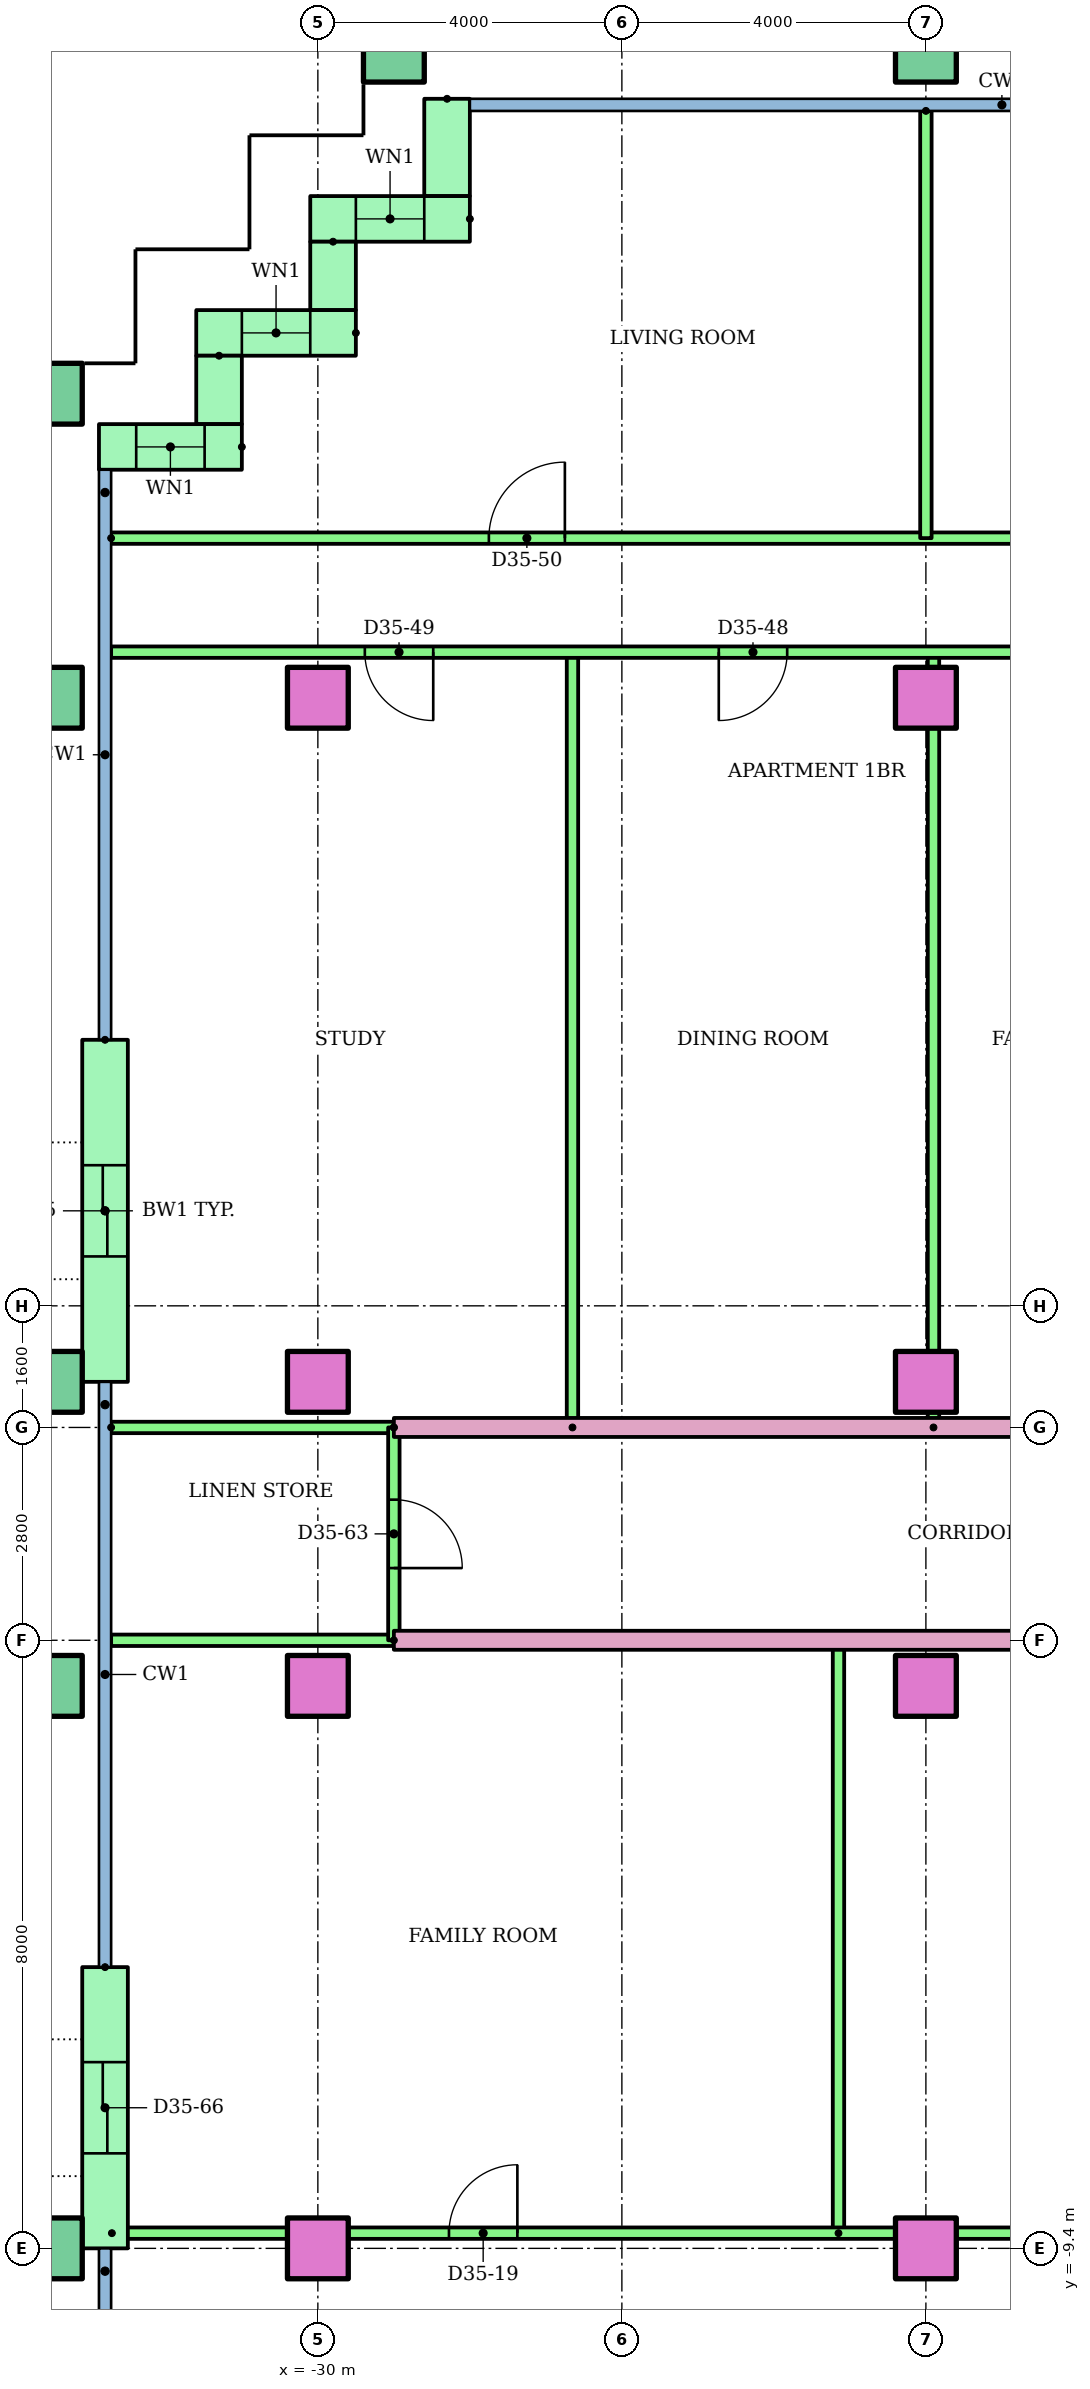
"""IFC4 building model, lengths in metres.
Left out: names, types, materials, properties, quantities, classifications, styles, units other than length and angle.
Written with IfcOpenShell. Run it as: python <this file> out.ifc"""

import sys

from ifc_helpers import new_model, si_unit, direction, frame, frame_2d, origin, origin_2d, place, context, subcontext, project, spatial, rectangle, hollow_rectangle, extrude, element, fill, save


model = new_model("IFC4")
c1 = context("Model", 3, precision=1e-05, world=origin(), true_north=direction((0.0, 1.0)))
c2 = subcontext(c1, "Body", "Model", "MODEL_VIEW")
j1 = project(units=[si_unit("LENGTHUNIT", "METRE"), si_unit("PLANEANGLEUNIT", "RADIAN")], contexts=[c1])
p1 = place(None, origin())
s1 = spatial("IfcSite", under=j1, at=p1, CompositionType="ELEMENT")
p2 = place(p1, origin())
s2 = spatial("IfcBuilding", under=s1, at=p2, CompositionType="ELEMENT")
p3 = place(p2, frame((0.0, 0.0, 135.8)))
s3 = spatial("IfcBuildingStorey", under=s2, at=p3, CompositionType="ELEMENT", Elevation=135.8)
p4 = place(p3, frame((-33.5, -9.4, 0.0)))
e1 = element("IfcColumn", 1, at=p4, inside=s3, PredefinedType="COLUMN", context=c2, shape_type="SweptSolid", body=[
    extrude(hollow_rectangle(XDim=0.8, YDim=0.8, WallThickness=0.04, at=origin_2d()), origin(), (0.0, 0.0, 1.0), 3.2),
])
for number, where in (
    (2, (-30.0, -9.4, 0.0)),
    (3, (-22.0, -9.4, 0.0)),
):
    element("IfcColumn", number, at=place(p3, frame(where)), inside=s3, PredefinedType="COLUMN", context=c2, shape_type="SweptSolid", body=[
        extrude(rectangle(XDim=0.8, YDim=0.8, at=origin_2d()), origin(), (0.0, 0.0, 1.0), 3.2),
    ])
p5 = place(p3, frame((-33.5, -2.0, 0.0)))
e4 = element("IfcColumn", 4, at=p5, inside=s3, PredefinedType="COLUMN", context=c2, shape_type="SweptSolid", body=[
    extrude(hollow_rectangle(XDim=0.8, YDim=0.8, WallThickness=0.04, at=origin_2d()), origin(), (0.0, 0.0, 1.0), 3.2),
])
for number, where in (
    (5, (-30.0, -2.0, 0.0)),
    (6, (-22.0, -2.0, 0.0)),
):
    element("IfcColumn", number, at=place(p3, frame(where)), inside=s3, PredefinedType="COLUMN", context=c2, shape_type="SweptSolid", body=[
        extrude(rectangle(XDim=0.8, YDim=0.8, at=origin_2d()), origin(), (0.0, 0.0, 1.0), 3.2),
    ])
p6 = place(p3, frame((-33.5, 2.0, 0.0)))
e7 = element("IfcColumn", 7, at=p6, inside=s3, PredefinedType="COLUMN", context=c2, shape_type="SweptSolid", body=[
    extrude(hollow_rectangle(XDim=0.8, YDim=0.8, WallThickness=0.04, at=origin_2d()), origin(), (0.0, 0.0, 1.0), 3.2),
])
for number, where in (
    (8, (-30.0, 2.0, 0.0)),
    (9, (-22.0, 2.0, 0.0)),
):
    element("IfcColumn", number, at=place(p3, frame(where)), inside=s3, PredefinedType="COLUMN", context=c2, shape_type="SweptSolid", body=[
        extrude(rectangle(XDim=0.8, YDim=0.8, at=origin_2d()), origin(), (0.0, 0.0, 1.0), 3.2),
    ])
p7 = place(p3, frame((-33.5, 11.0, 0.0)))
e10 = element("IfcColumn", 10, at=p7, inside=s3, PredefinedType="COLUMN", context=c2, shape_type="SweptSolid", body=[
    extrude(hollow_rectangle(XDim=0.8, YDim=0.8, WallThickness=0.04, at=origin_2d()), origin(), (0.0, 0.0, 1.0), 3.2),
])
for number, where in (
    (11, (-30.0, 11.0, 0.0)),
    (12, (-22.0, 11.0, 0.0)),
):
    element("IfcColumn", number, at=place(p3, frame(where)), inside=s3, PredefinedType="COLUMN", context=c2, shape_type="SweptSolid", body=[
        extrude(rectangle(XDim=0.8, YDim=0.8, at=origin_2d()), origin(), (0.0, 0.0, 1.0), 3.2),
    ])
for number, where in (
    (13, (-33.5, 15.0, 0.0)),
    (14, (-29.0, 19.5, 0.0)),
    (15, (-22.0, 19.5, 0.0)),
):
    element("IfcColumn", number, at=place(p3, frame(where)), inside=s3, PredefinedType="COLUMN", context=c2, shape_type="SweptSolid", body=[
        extrude(hollow_rectangle(XDim=0.8, YDim=0.8, WallThickness=0.04, at=origin_2d()), origin(), (0.0, 0.0, 1.0), 3.2),
    ])
p8 = place(p3, frame((-28.3, 18.88, 0.0), z_axis=(0.0, 0.0, 1.0), x_axis=(0.0, -1.0, 0.0)))
e16 = element("IfcWall", 16, at=p8, inside=s3, PredefinedType="STANDARD", context=c2, shape_type="SweptSolid", body=[
    extrude(rectangle(XDim=1.28, YDim=0.6, at=frame_2d((0.64, 0.0))), origin(), (0.0, 0.0, 1.0), 2.92),
])
p9 = place(p3, frame((-28.0, 17.3, 0.0), z_axis=(0.0, 0.0, 1.0), x_axis=(-1.0, 0.0, 0.0)))
e17 = element("IfcWall", 17, at=p9, inside=s3, PredefinedType="STANDARD", context=c2, shape_type="SweptSolid", body=[
    extrude(rectangle(XDim=2.1, YDim=0.6, at=frame_2d((1.05, 0.0))), origin(), (0.0, 0.0, 1.0), 2.92),
])
p10 = place(p9, frame((0.6, 0.0, 0.9)))
e18 = element("IfcOpeningElement", 18, at=p10, cuts=e17, PredefinedType="OPENING", context=c2, shape_type="SweptSolid", body=[
    extrude(rectangle(XDim=0.9, YDim=1.5, at=frame_2d((0.45, 0.75))), frame((0.0, 0.31, 0.0), z_axis=(0.0, -1.0, 0.0), x_axis=(1.0, 0.0, 0.0)), (0.0, 0.0, 1.0), 0.62),
])
p11 = place(p3, frame((-29.8, 17.0, 0.0), z_axis=(0.0, 0.0, 1.0), x_axis=(0.0, -1.0, 0.0)))
e19 = element("IfcWall", 19, at=p11, inside=s3, PredefinedType="STANDARD", context=c2, shape_type="SweptSolid", body=[
    extrude(rectangle(XDim=0.9, YDim=0.6, at=frame_2d((0.45, 0.0))), origin(), (0.0, 0.0, 1.0), 2.92),
])
p12 = place(p3, frame((-29.5, 15.8, 0.0), z_axis=(0.0, 0.0, 1.0), x_axis=(-1.0, 0.0, 0.0)))
e20 = element("IfcWall", 20, at=p12, inside=s3, PredefinedType="STANDARD", context=c2, shape_type="SweptSolid", body=[
    extrude(rectangle(XDim=2.1, YDim=0.6, at=frame_2d((1.05, 0.0))), origin(), (0.0, 0.0, 1.0), 2.92),
])
p13 = place(p12, frame((0.6, 0.0, 0.9)))
e21 = element("IfcOpeningElement", 21, at=p13, cuts=e20, PredefinedType="OPENING", context=c2, shape_type="SweptSolid", body=[
    extrude(rectangle(XDim=0.9, YDim=1.5, at=frame_2d((0.45, 0.75))), frame((0.0, 0.31, 0.0), z_axis=(0.0, -1.0, 0.0), x_axis=(1.0, 0.0, 0.0)), (0.0, 0.0, 1.0), 0.62),
])
p14 = place(p3, frame((-31.3, 15.5, 0.0), z_axis=(0.0, 0.0, 1.0), x_axis=(0.0, -1.0, 0.0)))
e22 = element("IfcWall", 22, at=p14, inside=s3, PredefinedType="STANDARD", context=c2, shape_type="SweptSolid", body=[
    extrude(rectangle(XDim=0.9, YDim=0.6, at=frame_2d((0.45, 0.0))), origin(), (0.0, 0.0, 1.0), 2.92),
])
p15 = place(p3, frame((-31.0, 14.3, 0.0), z_axis=(0.0, 0.0, 1.0), x_axis=(-1.0, 0.0, 0.0)))
e23 = element("IfcWall", 23, at=p15, inside=s3, PredefinedType="STANDARD", context=c2, shape_type="SweptSolid", body=[
    extrude(rectangle(XDim=1.88, YDim=0.6, at=frame_2d((0.94, 0.0))), origin(), (0.0, 0.0, 1.0), 2.92),
])
p16 = place(p15, frame((0.49, 0.0, 0.9)))
e24 = element("IfcOpeningElement", 24, at=p16, cuts=e23, PredefinedType="OPENING", context=c2, shape_type="SweptSolid", body=[
    extrude(rectangle(XDim=0.9, YDim=1.5, at=frame_2d((0.45, 0.75))), frame((0.0, 0.31, 0.0), z_axis=(0.0, -1.0, 0.0), x_axis=(1.0, 0.0, 0.0)), (0.0, 0.0, 1.0), 0.62),
])
p17 = place(p3, frame((-32.8, 6.5, 0.0), z_axis=(0.0, 0.0, 1.0), x_axis=(0.0, -1.0, 0.0)))
e25 = element("IfcWall", 25, at=p17, inside=s3, PredefinedType="STANDARD", context=c2, shape_type="SweptSolid", body=[
    extrude(rectangle(XDim=4.5, YDim=0.6, at=frame_2d((2.25, 0.0))), origin(), (0.0, 0.0, 1.0), 2.92),
])
p18 = place(p17, frame((1.65, 0.0, 0.0)))
e26 = element("IfcOpeningElement", 26, at=p18, cuts=e25, PredefinedType="OPENING", context=c2, shape_type="SweptSolid", body=[
    extrude(rectangle(XDim=1.2, YDim=2.1, at=frame_2d((0.6, 1.05))), frame((0.0, 0.31, 0.0), z_axis=(0.0, -1.0, 0.0), x_axis=(1.0, 0.0, 0.0)), (0.0, 0.0, 1.0), 0.62),
])
p19 = place(p3, frame((-32.8, -5.7, 0.0), z_axis=(0.0, 0.0, 1.0), x_axis=(0.0, -1.0, 0.0)))
e27 = element("IfcWall", 27, at=p19, inside=s3, PredefinedType="STANDARD", context=c2, shape_type="SweptSolid", body=[
    extrude(rectangle(XDim=3.7, YDim=0.6, at=frame_2d((1.85, 0.0))), origin(), (0.0, 0.0, 1.0), 2.92),
])
p20 = place(p19, frame((1.25, 0.0, 0.0)))
e28 = element("IfcOpeningElement", 28, at=p20, cuts=e27, PredefinedType="OPENING", context=c2, shape_type="SweptSolid", body=[
    extrude(rectangle(XDim=1.2, YDim=2.1, at=frame_2d((0.6, 1.05))), frame((0.0, 0.31, 0.0), z_axis=(0.0, -1.0, 0.0), x_axis=(1.0, 0.0, 0.0)), (0.0, 0.0, 1.0), 0.62),
])
p21 = place(p3, frame((-23.15, -9.2, 0.0), z_axis=(0.0, 0.0, 1.0), x_axis=(0.0, 1.0, 0.0)))
e29 = element("IfcWall", 29, at=p21, inside=s3, PredefinedType="PARTITIONING", context=c2, shape_type="SweptSolid", body=[
    extrude(rectangle(XDim=7.8, YDim=0.15, at=frame_2d((3.9, 0.0))), origin(), (0.0, 0.0, 1.0), 2.4),
])
p22 = place(p3, frame((-32.71, -9.2, 0.0)))
e30 = element("IfcWall", 30, at=p22, inside=s3, PredefinedType="PARTITIONING", context=c2, shape_type="SweptSolid", body=[
    extrude(rectangle(XDim=24.71, YDim=0.15, at=frame_2d((12.355, 0.0))), origin(), (0.0, 0.0, 1.0), 2.4),
])
p23 = place(p22, frame((19.328, 0.0, 0.0)))
e31 = element("IfcOpeningElement", 31, at=p23, cuts=e30, PredefinedType="OPENING", context=c2, shape_type="SweptSolid", body=[
    extrude(rectangle(XDim=0.9, YDim=2.1, at=frame_2d((0.45, 1.05))), frame((0.0, 0.085, 0.0), z_axis=(0.0, -1.0, 0.0), x_axis=(1.0, 0.0, 0.0)), (0.0, 0.0, 1.0), 0.17),
])
p24 = place(p22, frame((12.735, 0.0, 0.0)))
e32 = element("IfcOpeningElement", 32, at=p24, cuts=e30, PredefinedType="OPENING", context=c2, shape_type="SweptSolid", body=[
    extrude(rectangle(XDim=0.9, YDim=2.1, at=frame_2d((0.45, 1.05))), frame((0.0, 0.085, 0.0), z_axis=(0.0, -1.0, 0.0), x_axis=(1.0, 0.0, 0.0)), (0.0, 0.0, 1.0), 0.17),
])
p25 = place(p22, frame((4.435, 0.0, 0.0)))
e33 = element("IfcOpeningElement", 33, at=p25, cuts=e30, PredefinedType="OPENING", context=c2, shape_type="SweptSolid", body=[
    extrude(rectangle(XDim=0.9, YDim=2.1, at=frame_2d((0.45, 1.05))), frame((0.0, 0.085, 0.0), z_axis=(0.0, -1.0, 0.0), x_axis=(1.0, 0.0, 0.0)), (0.0, 0.0, 1.0), 0.17),
])
p26 = place(p3, frame((-14.0, -1.4, 0.0), z_axis=(0.0, 0.0, 1.0), x_axis=(-1.0, 0.0, 0.0)))
e34 = element("IfcWall", 34, at=p26, inside=s3, PredefinedType="PARTITIONING", context=c2, shape_type="SweptSolid", body=[
    extrude(rectangle(XDim=15.0, YDim=0.25, at=frame_2d((7.5, 0.0))), origin(), (0.0, 0.0, 1.0), 2.4),
])
p27 = place(p3, frame((-29.0, -1.4, 0.0), z_axis=(0.0, 0.0, 1.0), x_axis=(-1.0, 0.0, 0.0)))
e35 = element("IfcWall", 35, at=p27, inside=s3, PredefinedType="PARTITIONING", context=c2, shape_type="SweptSolid", body=[
    extrude(rectangle(XDim=3.72, YDim=0.15, at=frame_2d((1.86, 0.0))), origin(), (0.0, 0.0, 1.0), 2.4),
])
for number, where, z_axis, x_axis in (
    (36, (-21.9, 1.4, 0.0), (0.0, 0.0, 1.0), (0.0, 1.0, 0.0)),
    (37, (-26.65, 1.4, 0.0), (0.0, 0.0, 1.0), (0.0, 1.0, 0.0)),
):
    element("IfcWall", number, at=place(p3, frame(where, z_axis=z_axis, x_axis=x_axis)), inside=s3, PredefinedType="PARTITIONING", context=c2, shape_type="SweptSolid", body=[
        extrude(rectangle(XDim=10.2, YDim=0.15, at=frame_2d((5.1, 0.0))), origin(), (0.0, 0.0, 1.0), 2.4),
    ])
p28 = place(p3, frame((-16.0, 11.6, 0.0), z_axis=(0.0, 0.0, 1.0), x_axis=(-1.0, 0.0, 0.0)))
e38 = element("IfcWall", 38, at=p28, inside=s3, PredefinedType="PARTITIONING", context=c2, shape_type="SweptSolid", body=[
    extrude(rectangle(XDim=16.72, YDim=0.15, at=frame_2d((8.36, 0.0))), origin(), (0.0, 0.0, 1.0), 2.4),
])
p29 = place(p28, frame((3.7, 0.0, 0.0)))
e39 = element("IfcOpeningElement", 39, at=p29, cuts=e38, PredefinedType="OPENING", context=c2, shape_type="SweptSolid", body=[
    extrude(rectangle(XDim=0.9, YDim=2.1, at=frame_2d((0.45, 1.05))), frame((0.0, 0.085, 0.0), z_axis=(0.0, -1.0, 0.0), x_axis=(1.0, 0.0, 0.0)), (0.0, 0.0, 1.0), 0.17),
])
p30 = place(p28, frame((7.825, 0.0, 0.0)))
e40 = element("IfcOpeningElement", 40, at=p30, cuts=e38, PredefinedType="OPENING", context=c2, shape_type="SweptSolid", body=[
    extrude(rectangle(XDim=0.9, YDim=2.1, at=frame_2d((0.45, 1.05))), frame((0.0, 0.085, 0.0), z_axis=(0.0, -1.0, 0.0), x_axis=(1.0, 0.0, 0.0)), (0.0, 0.0, 1.0), 0.17),
])
p31 = place(p28, frame((12.482, 0.0, 0.0)))
e41 = element("IfcOpeningElement", 41, at=p31, cuts=e38, PredefinedType="OPENING", context=c2, shape_type="SweptSolid", body=[
    extrude(rectangle(XDim=0.9, YDim=2.1, at=frame_2d((0.45, 1.05))), frame((0.0, 0.085, 0.0), z_axis=(0.0, -1.0, 0.0), x_axis=(1.0, 0.0, 0.0)), (0.0, 0.0, 1.0), 0.17),
])
p32 = place(p3, frame((-32.72, 13.1, 0.0)))
e42 = element("IfcWall", 42, at=p32, inside=s3, PredefinedType="PARTITIONING", context=c2, shape_type="SweptSolid", body=[
    extrude(rectangle(XDim=18.72, YDim=0.15, at=frame_2d((9.36, 0.0))), origin(), (0.0, 0.0, 1.0), 2.4),
])
p33 = place(p32, frame((4.97, 0.0, 0.0)))
e43 = element("IfcOpeningElement", 43, at=p33, cuts=e42, PredefinedType="OPENING", context=c2, shape_type="SweptSolid", body=[
    extrude(rectangle(XDim=1.0, YDim=2.1, at=frame_2d((0.5, 1.05))), frame((0.0, 0.085, 0.0), z_axis=(0.0, -1.0, 0.0), x_axis=(1.0, 0.0, 0.0)), (0.0, 0.0, 1.0), 0.17),
])
p34 = place(p32, frame((14.27, 0.0, 0.0)))
e44 = element("IfcOpeningElement", 44, at=p34, cuts=e42, PredefinedType="OPENING", context=c2, shape_type="SweptSolid", body=[
    extrude(rectangle(XDim=0.9, YDim=2.1, at=frame_2d((0.45, 1.05))), frame((0.0, 0.085, 0.0), z_axis=(0.0, -1.0, 0.0), x_axis=(1.0, 0.0, 0.0)), (0.0, 0.0, 1.0), 0.17),
])
p35 = place(p3, frame((-22.0, 18.721, 0.0), z_axis=(0.0, 0.0, 1.0), x_axis=(0.0, -1.0, 0.0)))
e45 = element("IfcWall", 45, at=p35, inside=s3, PredefinedType="PARTITIONING", context=c2, shape_type="SweptSolid", body=[
    extrude(rectangle(XDim=5.621, YDim=0.15, at=frame_2d((2.811, 0.0))), origin(), (0.0, 0.0, 1.0), 2.4),
])
p36 = place(p3, frame((-29.0, 1.4, 0.0)))
e46 = element("IfcWall", 46, at=p36, inside=s3, PredefinedType="PARTITIONING", context=c2, shape_type="SweptSolid", body=[
    extrude(rectangle(XDim=15.0, YDim=0.25, at=frame_2d((7.5, 0.0))), origin(), (0.0, 0.0, 1.0), 2.4),
])
p37 = place(p36, frame((13.5, 0.0, 0.0)))
e47 = element("IfcOpeningElement", 47, at=p37, cuts=e46, PredefinedType="OPENING", context=c2, shape_type="SweptSolid", body=[
    extrude(rectangle(XDim=1.0, YDim=2.1, at=frame_2d((0.5, 1.05))), frame((0.0, 0.135, 0.0), z_axis=(0.0, -1.0, 0.0), x_axis=(1.0, 0.0, 0.0)), (0.0, 0.0, 1.0), 0.27),
])
p38 = place(p3, frame((-32.72, 1.4, 0.0)))
e48 = element("IfcWall", 48, at=p38, inside=s3, PredefinedType="PARTITIONING", context=c2, shape_type="SweptSolid", body=[
    extrude(rectangle(XDim=3.72, YDim=0.15, at=frame_2d((1.86, 0.0))), origin(), (0.0, 0.0, 1.0), 2.4),
])
p39 = place(p3, frame((-29.0, 1.4, 0.0), z_axis=(0.0, 0.0, 1.0), x_axis=(0.0, -1.0, 0.0)))
e49 = element("IfcWall", 49, at=p39, inside=s3, PredefinedType="PARTITIONING", context=c2, shape_type="SweptSolid", body=[
    extrude(rectangle(XDim=2.8, YDim=0.15, at=frame_2d((1.4, 0.0))), origin(), (0.0, 0.0, 1.0), 2.4),
])
p40 = place(p39, frame((0.95, 0.0, 0.0)))
e50 = element("IfcOpeningElement", 50, at=p40, cuts=e49, PredefinedType="OPENING", context=c2, shape_type="SweptSolid", body=[
    extrude(rectangle(XDim=0.9, YDim=2.1, at=frame_2d((0.45, 1.05))), frame((0.0, 0.085, 0.0), z_axis=(0.0, -1.0, 0.0), x_axis=(1.0, 0.0, 0.0)), (0.0, 0.0, 1.0), 0.17),
])
p41 = place(p10, origin())
e51 = element("IfcWindow", 51, at=p41, inside=s3, PartitioningType="SINGLE_PANEL", PredefinedType="WINDOW", context=c2, shape_type="SweptSolid", body=[
    extrude(rectangle(XDim=0.9, YDim=1.5, at=frame_2d((0.45, 0.75))), frame((0.0, 0.03, 0.0), z_axis=(0.0, -1.0, 0.0), x_axis=(1.0, 0.0, 0.0)), (0.0, 0.0, 1.0), 0.06),
])
fill(e18, e51)
p42 = place(p13, origin())
e52 = element("IfcWindow", 52, at=p42, inside=s3, PartitioningType="SINGLE_PANEL", PredefinedType="WINDOW", context=c2, shape_type="SweptSolid", body=[
    extrude(rectangle(XDim=0.9, YDim=1.5, at=frame_2d((0.45, 0.75))), frame((0.0, 0.03, 0.0), z_axis=(0.0, -1.0, 0.0), x_axis=(1.0, 0.0, 0.0)), (0.0, 0.0, 1.0), 0.06),
])
fill(e21, e52)
p43 = place(p16, origin())
e53 = element("IfcWindow", 53, at=p43, inside=s3, PartitioningType="SINGLE_PANEL", PredefinedType="WINDOW", context=c2, shape_type="SweptSolid", body=[
    extrude(rectangle(XDim=0.9, YDim=1.5, at=frame_2d((0.45, 0.75))), frame((0.0, 0.03, 0.0), z_axis=(0.0, -1.0, 0.0), x_axis=(1.0, 0.0, 0.0)), (0.0, 0.0, 1.0), 0.06),
])
fill(e24, e53)
p44 = place(p25, origin())
e54 = element("IfcDoor", 54, at=p44, inside=s3, OperationType="SINGLE_SWING_RIGHT", PredefinedType="DOOR", context=c2, shape_type="SweptSolid", body=[
    extrude(rectangle(XDim=0.9, YDim=2.1, at=frame_2d((0.45, 1.05))), frame((0.0, 0.025, 0.0), z_axis=(0.0, -1.0, 0.0), x_axis=(1.0, 0.0, 0.0)), (0.0, 0.0, 1.0), 0.05),
])
fill(e33, e54)
p45 = place(p30, origin())
e55 = element("IfcDoor", 55, at=p45, inside=s3, OperationType="SINGLE_SWING_RIGHT", PredefinedType="DOOR", context=c2, shape_type="SweptSolid", body=[
    extrude(rectangle(XDim=0.9, YDim=2.1, at=frame_2d((0.45, 1.05))), frame((0.0, 0.025, 0.0), z_axis=(0.0, -1.0, 0.0), x_axis=(1.0, 0.0, 0.0)), (0.0, 0.0, 1.0), 0.05),
])
fill(e40, e55)
p46 = place(p31, origin())
e56 = element("IfcDoor", 56, at=p46, inside=s3, OperationType="SINGLE_SWING_LEFT", PredefinedType="DOOR", context=c2, shape_type="SweptSolid", body=[
    extrude(rectangle(XDim=0.9, YDim=2.1, at=frame_2d((0.45, 1.05))), frame((0.0, 0.025, 0.0), z_axis=(0.0, -1.0, 0.0), x_axis=(1.0, 0.0, 0.0)), (0.0, 0.0, 1.0), 0.05),
])
fill(e41, e56)
p47 = place(p33, origin())
e57 = element("IfcDoor", 57, at=p47, inside=s3, OperationType="SINGLE_SWING_RIGHT", PredefinedType="DOOR", context=c2, shape_type="SweptSolid", body=[
    extrude(rectangle(XDim=1.0, YDim=2.1, at=frame_2d((0.5, 1.05))), frame((0.0, 0.025, 0.0), z_axis=(0.0, -1.0, 0.0), x_axis=(1.0, 0.0, 0.0)), (0.0, 0.0, 1.0), 0.05),
])
fill(e43, e57)
p48 = place(p40, origin())
e58 = element("IfcDoor", 58, at=p48, inside=s3, OperationType="SINGLE_SWING_RIGHT", PredefinedType="DOOR", context=c2, shape_type="SweptSolid", body=[
    extrude(rectangle(XDim=0.9, YDim=2.1, at=frame_2d((0.45, 1.05))), frame((0.0, 0.025, 0.0), z_axis=(0.0, -1.0, 0.0), x_axis=(1.0, 0.0, 0.0)), (0.0, 0.0, 1.0), 0.05),
])
fill(e50, e58)
p49 = place(p18, origin())
e59 = element("IfcDoor", 59, at=p49, inside=s3, OperationType="SLIDING_TO_LEFT", PredefinedType="DOOR", context=c2, shape_type="SweptSolid", body=[
    extrude(rectangle(XDim=1.2, YDim=2.1, at=frame_2d((0.6, 1.05))), frame((0.0, 0.025, 0.0), z_axis=(0.0, -1.0, 0.0), x_axis=(1.0, 0.0, 0.0)), (0.0, 0.0, 1.0), 0.05),
])
fill(e26, e59)
p50 = place(p20, origin())
e60 = element("IfcDoor", 60, at=p50, inside=s3, OperationType="SLIDING_TO_LEFT", PredefinedType="DOOR", context=c2, shape_type="SweptSolid", body=[
    extrude(rectangle(XDim=1.2, YDim=2.1, at=frame_2d((0.6, 1.05))), frame((0.0, 0.025, 0.0), z_axis=(0.0, -1.0, 0.0), x_axis=(1.0, 0.0, 0.0)), (0.0, 0.0, 1.0), 0.05),
])
fill(e28, e60)
save(model, sys.argv[1])
